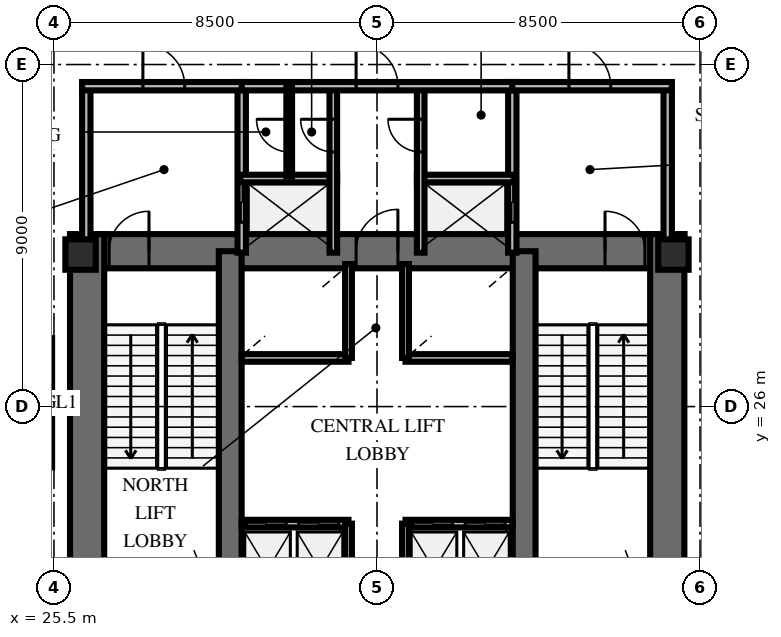
"""IFC4 building model, lengths in metres.
Left out: names, types, materials, properties, quantities, classifications, styles, units other than length and angle.
Written with IfcOpenShell. Run it as: python <this file> out.ifc"""

import sys

from ifc_helpers import new_model, si_unit, direction, frame, frame_2d, origin, origin_2d, place, context, subcontext, project, spatial, rectangle, extrude, element, fill, save


model = new_model("IFC4")
c1 = context("Model", 3, precision=1e-05, world=origin(), true_north=direction((0.0, 1.0)))
c2 = subcontext(c1, "Body", "Model", "MODEL_VIEW")
j1 = project(units=[si_unit("LENGTHUNIT", "METRE"), si_unit("PLANEANGLEUNIT", "RADIAN")], contexts=[c1])
p1 = place(None, origin())
s1 = spatial("IfcSite", under=j1, at=p1, CompositionType="ELEMENT")
p2 = place(p1, origin())
s2 = spatial("IfcBuilding", under=s1, at=p2, CompositionType="ELEMENT")
p3 = place(p2, frame((0.0, 0.0, 20.4)))
s3 = spatial("IfcBuildingStorey", under=s2, at=p3, CompositionType="ELEMENT", Elevation=20.4)
p4 = place(p3, frame((25.922, 30.088, 0.0), z_axis=(0.0, 0.0, 1.0), x_axis=(1.0, 0.0, 0.0)))
e1 = element("IfcWall", 1, at=p4, inside=s3, PredefinedType="SHEAR", context=c2, shape_type="SweptSolid", body=[
    extrude(rectangle(XDim=16.166, YDim=0.9, at=frame_2d((8.083, 0.0))), origin(), (0.0, 0.0, 1.0), 4.8),
])
p5 = place(p4, frame((1.028, 0.0, 0.0)))
e2 = element("IfcOpeningElement", 2, at=p5, cuts=e1, PredefinedType="OPENING", context=c2, shape_type="SweptSolid", body=[
    extrude(rectangle(XDim=1.05, YDim=2.15, at=frame_2d((0.525, 1.075))), frame((0.0, 0.46, 0.0), z_axis=(0.0, -1.0, 0.0), x_axis=(1.0, 0.0, 0.0)), (0.0, 0.0, 1.0), 0.92),
])
p6 = place(p4, frame((14.078, 0.0, 0.0)))
e3 = element("IfcOpeningElement", 3, at=p6, cuts=e1, PredefinedType="OPENING", context=c2, shape_type="SweptSolid", body=[
    extrude(rectangle(XDim=1.05, YDim=2.15, at=frame_2d((0.525, 1.075))), frame((0.0, 0.46, 0.0), z_axis=(0.0, -1.0, 0.0), x_axis=(1.0, 0.0, 0.0)), (0.0, 0.0, 1.0), 0.92),
])
p7 = place(p4, frame((7.528, 0.0, 0.0)))
e4 = element("IfcOpeningElement", 4, at=p7, cuts=e1, PredefinedType="OPENING", context=c2, shape_type="SweptSolid", body=[
    extrude(rectangle(XDim=1.1, YDim=2.15, at=frame_2d((0.55, 1.075))), frame((0.0, 0.46, 0.0), z_axis=(0.0, -1.0, 0.0), x_axis=(1.0, 0.0, 0.0)), (0.0, 0.0, 1.0), 0.92),
])
for number, where, z_axis, x_axis in (
    (5, (26.372, 19.662, 0.0), (0.0, 0.0, 1.0), (0.0, 1.0, 0.0)),
    (6, (41.638, 19.662, 0.0), (0.0, 0.0, 1.0), (0.0, 1.0, 0.0)),
):
    element("IfcWall", number, at=place(p3, frame(where, z_axis=z_axis, x_axis=x_axis)), inside=s3, PredefinedType="SHEAR", context=c2, shape_type="SweptSolid", body=[
        extrude(rectangle(XDim=10.876, YDim=0.9, at=frame_2d((5.438, 0.0))), origin(), (0.0, 0.0, 1.0), 4.8),
    ])
for number, where, z_axis, x_axis in (
    (7, (30.138, 20.112, 0.0), (0.0, 0.0, 1.0), (0.0, 1.0, 0.0)),
    (8, (37.872, 20.112, 0.0), (0.0, 0.0, 1.0), (0.0, 1.0, 0.0)),
):
    element("IfcWall", number, at=place(p3, frame(where, z_axis=z_axis, x_axis=x_axis)), inside=s3, PredefinedType="SHEAR", context=c2, shape_type="SweptSolid", body=[
        extrude(rectangle(XDim=9.976, YDim=0.6, at=frame_2d((4.988, 0.0))), origin(), (0.0, 0.0, 1.0), 4.8),
    ])
for number, where, z_axis, x_axis in (
    (9, (26.2, 30.0, 0.0), (0.0, 0.0, 1.0), (1.0, 0.0, 0.0)),
    (10, (41.8, 30.0, 0.0), (0.0, 0.0, 1.0), (1.0, 0.0, 0.0)),
):
    element("IfcColumn", number, at=place(p3, frame(where, z_axis=z_axis, x_axis=x_axis)), inside=s3, PredefinedType="PILASTER", context=c2, shape_type="SweptSolid", body=[
        extrude(rectangle(XDim=0.8, YDim=0.8, at=origin_2d()), origin(), (0.0, 0.0, 1.0), 4.8),
    ])
p8 = place(p3, frame((26.35, 30.05, 0.0), z_axis=(0.0, 0.0, 1.0), x_axis=(0.0, 1.0, 0.0)))
e11 = element("IfcWall", 11, at=p8, inside=s3, PredefinedType="SOLIDWALL", context=c2, shape_type="SweptSolid", body=[
    extrude(rectangle(XDim=4.38, YDim=0.22, at=frame_2d((2.19, 0.0))), origin(), (0.0, 0.0, 1.0), 3.56),
])
p9 = place(p3, frame((30.44, 30.05, 0.0), z_axis=(0.0, 0.0, 1.0), x_axis=(0.0, 1.0, 0.0)))
e12 = element("IfcWall", 12, at=p9, inside=s3, PredefinedType="SOLIDWALL", context=c2, shape_type="SweptSolid", body=[
    extrude(rectangle(XDim=4.38, YDim=0.22, at=frame_2d((2.19, 0.0))), origin(), (0.0, 0.0, 1.0), 3.56),
])
p10 = place(p9, frame((0.8, 0.0, 0.0)))
e13 = element("IfcOpeningElement", 13, at=p10, cuts=e12, PredefinedType="OPENING", context=c2, shape_type="SweptSolid", body=[
    extrude(rectangle(XDim=1.05, YDim=2.1, at=frame_2d((0.525, 1.05))), frame((0.0, 0.12, 0.0), z_axis=(0.0, -1.0, 0.0), x_axis=(1.0, 0.0, 0.0)), (0.0, 0.0, 1.0), 0.24),
])
p11 = place(p3, frame((26.24, 34.43, 0.0), z_axis=(0.0, 0.0, 1.0), x_axis=(1.0, 0.0, 0.0)))
e14 = element("IfcWall", 14, at=p11, inside=s3, PredefinedType="SOLIDWALL", context=c2, shape_type="SweptSolid", body=[
    extrude(rectangle(XDim=4.31, YDim=0.22, at=frame_2d((2.155, 0.0))), origin(), (0.0, 0.0, 1.0), 3.56),
])
p12 = place(p11, frame((1.6, 0.0, 0.0)))
e15 = element("IfcOpeningElement", 15, at=p12, cuts=e14, PredefinedType="OPENING", context=c2, shape_type="SweptSolid", body=[
    extrude(rectangle(XDim=1.1, YDim=2.15, at=frame_2d((0.55, 1.075))), frame((0.0, 0.12, 0.0), z_axis=(0.0, -1.0, 0.0), x_axis=(1.0, 0.0, 0.0)), (0.0, 0.0, 1.0), 0.24),
])
p13 = place(p3, frame((30.4, 32.0, 0.0), z_axis=(0.0, 0.0, 1.0), x_axis=(1.0, 0.0, 0.0)))
e16 = element("IfcWall", 16, at=p13, inside=s3, PredefinedType="SOLIDWALL", context=c2, shape_type="SweptSolid", body=[
    extrude(rectangle(XDim=2.55, YDim=0.2, at=frame_2d((1.275, 0.0))), origin(), (0.0, 0.0, 1.0), 3.56),
])
p14 = place(p3, frame((32.85, 30.05, 0.0), z_axis=(0.0, 0.0, 1.0), x_axis=(0.0, 1.0, 0.0)))
e17 = element("IfcWall", 17, at=p14, inside=s3, PredefinedType="SOLIDWALL", context=c2, shape_type="SweptSolid", body=[
    extrude(rectangle(XDim=4.38, YDim=0.2, at=frame_2d((2.19, 0.0))), origin(), (0.0, 0.0, 1.0), 3.56),
])
p15 = place(p14, frame((2.65, 0.0, 0.0)))
e18 = element("IfcOpeningElement", 18, at=p15, cuts=e17, PredefinedType="OPENING", context=c2, shape_type="SweptSolid", body=[
    extrude(rectangle(XDim=0.86, YDim=2.05, at=frame_2d((0.43, 1.025))), frame((0.0, 0.11, 0.0), z_axis=(0.0, -1.0, 0.0), x_axis=(1.0, 0.0, 0.0)), (0.0, 0.0, 1.0), 0.22),
])
p16 = place(p3, frame((37.56, 30.05, 0.0), z_axis=(0.0, 0.0, 1.0), x_axis=(0.0, 1.0, 0.0)))
e19 = element("IfcWall", 19, at=p16, inside=s3, PredefinedType="SOLIDWALL", context=c2, shape_type="SweptSolid", body=[
    extrude(rectangle(XDim=4.38, YDim=0.22, at=frame_2d((2.19, 0.0))), origin(), (0.0, 0.0, 1.0), 3.56),
])
p17 = place(p16, frame((0.8, 0.0, 0.0)))
e20 = element("IfcOpeningElement", 20, at=p17, cuts=e19, PredefinedType="OPENING", context=c2, shape_type="SweptSolid", body=[
    extrude(rectangle(XDim=1.05, YDim=2.1, at=frame_2d((0.525, 1.05))), frame((0.0, 0.12, 0.0), z_axis=(0.0, -1.0, 0.0), x_axis=(1.0, 0.0, 0.0)), (0.0, 0.0, 1.0), 0.24),
])
p18 = place(p3, frame((41.65, 30.05, 0.0), z_axis=(0.0, 0.0, 1.0), x_axis=(0.0, 1.0, 0.0)))
e21 = element("IfcWall", 21, at=p18, inside=s3, PredefinedType="SOLIDWALL", context=c2, shape_type="SweptSolid", body=[
    extrude(rectangle(XDim=4.38, YDim=0.22, at=frame_2d((2.19, 0.0))), origin(), (0.0, 0.0, 1.0), 3.56),
])
p19 = place(p3, frame((37.45, 34.43, 0.0), z_axis=(0.0, 0.0, 1.0), x_axis=(1.0, 0.0, 0.0)))
e22 = element("IfcWall", 22, at=p19, inside=s3, PredefinedType="SOLIDWALL", context=c2, shape_type="SweptSolid", body=[
    extrude(rectangle(XDim=4.31, YDim=0.22, at=frame_2d((2.155, 0.0))), origin(), (0.0, 0.0, 1.0), 3.56),
])
p20 = place(p19, frame((1.6, 0.0, 0.0)))
e23 = element("IfcOpeningElement", 23, at=p20, cuts=e22, PredefinedType="OPENING", context=c2, shape_type="SweptSolid", body=[
    extrude(rectangle(XDim=1.1, YDim=2.15, at=frame_2d((0.55, 1.075))), frame((0.0, 0.12, 0.0), z_axis=(0.0, -1.0, 0.0), x_axis=(1.0, 0.0, 0.0)), (0.0, 0.0, 1.0), 0.24),
])
p21 = place(p3, frame((35.05, 32.0, 0.0), z_axis=(0.0, 0.0, 1.0), x_axis=(1.0, 0.0, 0.0)))
e24 = element("IfcWall", 24, at=p21, inside=s3, PredefinedType="SOLIDWALL", context=c2, shape_type="SweptSolid", body=[
    extrude(rectangle(XDim=2.55, YDim=0.2, at=frame_2d((1.275, 0.0))), origin(), (0.0, 0.0, 1.0), 3.56),
])
p22 = place(p3, frame((35.15, 30.05, 0.0), z_axis=(0.0, 0.0, 1.0), x_axis=(0.0, 1.0, 0.0)))
e25 = element("IfcWall", 25, at=p22, inside=s3, PredefinedType="SOLIDWALL", context=c2, shape_type="SweptSolid", body=[
    extrude(rectangle(XDim=4.38, YDim=0.2, at=frame_2d((2.19, 0.0))), origin(), (0.0, 0.0, 1.0), 3.56),
])
p23 = place(p22, frame((2.65, 0.0, 0.0)))
e26 = element("IfcOpeningElement", 26, at=p23, cuts=e25, PredefinedType="OPENING", context=c2, shape_type="SweptSolid", body=[
    extrude(rectangle(XDim=0.86, YDim=2.05, at=frame_2d((0.43, 1.025))), frame((0.0, 0.11, 0.0), z_axis=(0.0, -1.0, 0.0), x_axis=(1.0, 0.0, 0.0)), (0.0, 0.0, 1.0), 0.22),
])
p24 = place(p3, frame((30.44, 34.43, 0.0), z_axis=(0.0, 0.0, 1.0), x_axis=(1.0, 0.0, 0.0)))
e27 = element("IfcWall", 27, at=p24, inside=s3, PredefinedType="SOLIDWALL", context=c2, shape_type="SweptSolid", body=[
    extrude(rectangle(XDim=7.12, YDim=0.22, at=frame_2d((3.56, 0.0))), origin(), (0.0, 0.0, 1.0), 3.56),
])
p25 = place(p24, frame((3.01, 0.0, 0.0)))
e28 = element("IfcOpeningElement", 28, at=p25, cuts=e27, PredefinedType="OPENING", context=c2, shape_type="SweptSolid", body=[
    extrude(rectangle(XDim=1.1, YDim=2.15, at=frame_2d((0.55, 1.075))), frame((0.0, 0.12, 0.0), z_axis=(0.0, -1.0, 0.0), x_axis=(1.0, 0.0, 0.0)), (0.0, 0.0, 1.0), 0.24),
])
p26 = place(p3, frame((31.69, 32.05, 0.0), z_axis=(0.0, 0.0, 1.0), x_axis=(0.0, 1.0, 0.0)))
e29 = element("IfcWall", 29, at=p26, inside=s3, PredefinedType="PARTITIONING", context=c2, shape_type="SweptSolid", body=[
    extrude(rectangle(XDim=2.33, YDim=0.15, at=frame_2d((1.165, 0.0))), origin(), (0.0, 0.0, 1.0), 3.56),
])
p27 = place(p26, frame((0.65, 0.0, 0.0)))
e30 = element("IfcOpeningElement", 30, at=p27, cuts=e29, PredefinedType="OPENING", context=c2, shape_type="SweptSolid", body=[
    extrude(rectangle(XDim=0.86, YDim=2.05, at=frame_2d((0.43, 1.025))), frame((0.0, 0.085, 0.0), z_axis=(0.0, -1.0, 0.0), x_axis=(1.0, 0.0, 0.0)), (0.0, 0.0, 1.0), 0.17),
])
p28 = place(p3, frame((30.44, 22.92, 0.0), z_axis=(0.0, 0.0, 1.0), x_axis=(1.0, 0.0, 0.0)))
e31 = element("IfcWall", 31, at=p28, inside=s3, PredefinedType="SOLIDWALL", context=c2, shape_type="SweptSolid", body=[
    extrude(rectangle(XDim=2.81, YDim=0.2, at=frame_2d((1.405, 0.0))), origin(), (0.0, 0.0, 1.0), 3.56),
])
p29 = place(p28, frame((0.12, 0.0, 0.0)))
e32 = element("IfcOpeningElement", 32, at=p29, cuts=e31, PredefinedType="OPENING", context=c2, shape_type="SweptSolid", body=[
    extrude(rectangle(XDim=1.05, YDim=2.1, at=frame_2d((0.525, 1.05))), frame((0.0, 0.11, 0.0), z_axis=(0.0, -1.0, 0.0), x_axis=(1.0, 0.0, 0.0)), (0.0, 0.0, 1.0), 0.22),
])
p30 = place(p28, frame((1.5, 0.0, 0.0)))
e33 = element("IfcOpeningElement", 33, at=p30, cuts=e31, PredefinedType="OPENING", context=c2, shape_type="SweptSolid", body=[
    extrude(rectangle(XDim=1.05, YDim=2.1, at=frame_2d((0.525, 1.05))), frame((0.0, 0.11, 0.0), z_axis=(0.0, -1.0, 0.0), x_axis=(1.0, 0.0, 0.0)), (0.0, 0.0, 1.0), 0.22),
])
p31 = place(p3, frame((33.25, 20.5, 0.0), z_axis=(0.0, 0.0, 1.0), x_axis=(0.0, 1.0, 0.0)))
e34 = element("IfcWall", 34, at=p31, inside=s3, PredefinedType="SOLIDWALL", context=c2, shape_type="SweptSolid", body=[
    extrude(rectangle(XDim=2.42, YDim=0.18, at=frame_2d((1.21, 0.0))), origin(), (0.0, 0.0, 1.0), 3.56),
])
p32 = place(p3, frame((34.75, 22.92, 0.0), z_axis=(0.0, 0.0, 1.0), x_axis=(1.0, 0.0, 0.0)))
e35 = element("IfcWall", 35, at=p32, inside=s3, PredefinedType="SOLIDWALL", context=c2, shape_type="SweptSolid", body=[
    extrude(rectangle(XDim=2.81, YDim=0.2, at=frame_2d((1.405, 0.0))), origin(), (0.0, 0.0, 1.0), 3.56),
])
p33 = place(p32, frame((0.19, 0.0, 0.0)))
e36 = element("IfcOpeningElement", 36, at=p33, cuts=e35, PredefinedType="OPENING", context=c2, shape_type="SweptSolid", body=[
    extrude(rectangle(XDim=1.05, YDim=2.1, at=frame_2d((0.525, 1.05))), frame((0.0, 0.11, 0.0), z_axis=(0.0, -1.0, 0.0), x_axis=(1.0, 0.0, 0.0)), (0.0, 0.0, 1.0), 0.22),
])
p34 = place(p32, frame((1.57, 0.0, 0.0)))
e37 = element("IfcOpeningElement", 37, at=p34, cuts=e35, PredefinedType="OPENING", context=c2, shape_type="SweptSolid", body=[
    extrude(rectangle(XDim=1.05, YDim=2.1, at=frame_2d((0.525, 1.05))), frame((0.0, 0.11, 0.0), z_axis=(0.0, -1.0, 0.0), x_axis=(1.0, 0.0, 0.0)), (0.0, 0.0, 1.0), 0.22),
])
p35 = place(p3, frame((34.75, 20.5, 0.0), z_axis=(0.0, 0.0, 1.0), x_axis=(0.0, 1.0, 0.0)))
e38 = element("IfcWall", 38, at=p35, inside=s3, PredefinedType="SOLIDWALL", context=c2, shape_type="SweptSolid", body=[
    extrude(rectangle(XDim=2.42, YDim=0.18, at=frame_2d((1.21, 0.0))), origin(), (0.0, 0.0, 1.0), 3.56),
])
p36 = place(p3, frame((30.44, 27.28, 0.0), z_axis=(0.0, 0.0, 1.0), x_axis=(1.0, 0.0, 0.0)))
e39 = element("IfcWall", 39, at=p36, inside=s3, PredefinedType="SOLIDWALL", context=c2, shape_type="SweptSolid", body=[
    extrude(rectangle(XDim=2.81, YDim=0.2, at=frame_2d((1.405, 0.0))), origin(), (0.0, 0.0, 1.0), 3.56),
])
p37 = place(p3, frame((33.25, 27.28, 0.0), z_axis=(0.0, 0.0, 1.0), x_axis=(0.0, 1.0, 0.0)))
e40 = element("IfcWall", 40, at=p37, inside=s3, PredefinedType="SOLIDWALL", context=c2, shape_type="SweptSolid", body=[
    extrude(rectangle(XDim=2.47, YDim=0.18, at=frame_2d((1.235, 0.0))), origin(), (0.0, 0.0, 1.0), 3.56),
])
p38 = place(p3, frame((34.75, 27.28, 0.0), z_axis=(0.0, 0.0, 1.0), x_axis=(1.0, 0.0, 0.0)))
e41 = element("IfcWall", 41, at=p38, inside=s3, PredefinedType="SOLIDWALL", context=c2, shape_type="SweptSolid", body=[
    extrude(rectangle(XDim=2.81, YDim=0.2, at=frame_2d((1.405, 0.0))), origin(), (0.0, 0.0, 1.0), 3.56),
])
p39 = place(p3, frame((34.75, 27.28, 0.0), z_axis=(0.0, 0.0, 1.0), x_axis=(0.0, 1.0, 0.0)))
e42 = element("IfcWall", 42, at=p39, inside=s3, PredefinedType="SOLIDWALL", context=c2, shape_type="SweptSolid", body=[
    extrude(rectangle(XDim=2.47, YDim=0.18, at=frame_2d((1.235, 0.0))), origin(), (0.0, 0.0, 1.0), 3.56),
])
p40 = place(p5, origin())
e43 = element("IfcDoor", 43, at=p40, inside=s3, OperationType="SINGLE_SWING_RIGHT", PredefinedType="DOOR", context=c2, shape_type="SweptSolid", body=[
    extrude(rectangle(XDim=1.05, YDim=2.15, at=frame_2d((0.525, 1.075))), frame((0.0, 0.025, 0.0), z_axis=(0.0, -1.0, 0.0), x_axis=(1.0, 0.0, 0.0)), (0.0, 0.0, 1.0), 0.05),
])
fill(e2, e43)
p41 = place(p6, origin())
e44 = element("IfcDoor", 44, at=p41, inside=s3, OperationType="SINGLE_SWING_LEFT", PredefinedType="DOOR", context=c2, shape_type="SweptSolid", body=[
    extrude(rectangle(XDim=1.05, YDim=2.15, at=frame_2d((0.525, 1.075))), frame((0.0, 0.025, 0.0), z_axis=(0.0, -1.0, 0.0), x_axis=(1.0, 0.0, 0.0)), (0.0, 0.0, 1.0), 0.05),
])
fill(e3, e44)
p42 = place(p7, origin())
e45 = element("IfcDoor", 45, at=p42, inside=s3, OperationType="SINGLE_SWING_RIGHT", PredefinedType="DOOR", context=c2, shape_type="SweptSolid", body=[
    extrude(rectangle(XDim=1.1, YDim=2.15, at=frame_2d((0.55, 1.075))), frame((0.0, 0.025, 0.0), z_axis=(0.0, -1.0, 0.0), x_axis=(1.0, 0.0, 0.0)), (0.0, 0.0, 1.0), 0.05),
])
fill(e4, e45)
p43 = place(p12, origin())
e46 = element("IfcDoor", 46, at=p43, inside=s3, OperationType="SINGLE_SWING_LEFT", PredefinedType="DOOR", context=c2, shape_type="SweptSolid", body=[
    extrude(rectangle(XDim=1.1, YDim=2.15, at=frame_2d((0.55, 1.075))), frame((0.0, 0.025, 0.0), z_axis=(0.0, -1.0, 0.0), x_axis=(1.0, 0.0, 0.0)), (0.0, 0.0, 1.0), 0.05),
])
fill(e15, e46)
p44 = place(p10, origin())
e47 = element("IfcDoor", 47, at=p44, inside=s3, OperationType="DOUBLE_DOOR_SLIDING", PredefinedType="USERDEFINED", context=c2, shape_type="SweptSolid", body=[
    extrude(rectangle(XDim=1.05, YDim=2.1, at=frame_2d((0.525, 1.05))), frame((0.0, 0.025, 0.0), z_axis=(0.0, -1.0, 0.0), x_axis=(1.0, 0.0, 0.0)), (0.0, 0.0, 1.0), 0.05),
])
fill(e13, e47)
p45 = place(p15, origin())
e48 = element("IfcDoor", 48, at=p45, inside=s3, OperationType="SINGLE_SWING_RIGHT", PredefinedType="TRAPDOOR", context=c2, shape_type="SweptSolid", body=[
    extrude(rectangle(XDim=0.86, YDim=2.05, at=frame_2d((0.43, 1.025))), frame((0.0, 0.025, 0.0), z_axis=(0.0, -1.0, 0.0), x_axis=(1.0, 0.0, 0.0)), (0.0, 0.0, 1.0), 0.05),
])
fill(e18, e48)
p46 = place(p20, origin())
e49 = element("IfcDoor", 49, at=p46, inside=s3, OperationType="SINGLE_SWING_LEFT", PredefinedType="DOOR", context=c2, shape_type="SweptSolid", body=[
    extrude(rectangle(XDim=1.1, YDim=2.15, at=frame_2d((0.55, 1.075))), frame((0.0, 0.025, 0.0), z_axis=(0.0, -1.0, 0.0), x_axis=(1.0, 0.0, 0.0)), (0.0, 0.0, 1.0), 0.05),
])
fill(e23, e49)
p47 = place(p17, origin())
e50 = element("IfcDoor", 50, at=p47, inside=s3, OperationType="DOUBLE_DOOR_SLIDING", PredefinedType="USERDEFINED", context=c2, shape_type="SweptSolid", body=[
    extrude(rectangle(XDim=1.05, YDim=2.1, at=frame_2d((0.525, 1.05))), frame((0.0, 0.025, 0.0), z_axis=(0.0, -1.0, 0.0), x_axis=(1.0, 0.0, 0.0)), (0.0, 0.0, 1.0), 0.05),
])
fill(e20, e50)
p48 = place(p23, origin())
e51 = element("IfcDoor", 51, at=p48, inside=s3, OperationType="SINGLE_SWING_RIGHT", PredefinedType="TRAPDOOR", context=c2, shape_type="SweptSolid", body=[
    extrude(rectangle(XDim=0.86, YDim=2.05, at=frame_2d((0.43, 1.025))), frame((0.0, 0.025, 0.0), z_axis=(0.0, -1.0, 0.0), x_axis=(1.0, 0.0, 0.0)), (0.0, 0.0, 1.0), 0.05),
])
fill(e26, e51)
p49 = place(p25, origin())
e52 = element("IfcDoor", 52, at=p49, inside=s3, OperationType="SINGLE_SWING_LEFT", PredefinedType="DOOR", context=c2, shape_type="SweptSolid", body=[
    extrude(rectangle(XDim=1.1, YDim=2.15, at=frame_2d((0.55, 1.075))), frame((0.0, 0.025, 0.0), z_axis=(0.0, -1.0, 0.0), x_axis=(1.0, 0.0, 0.0)), (0.0, 0.0, 1.0), 0.05),
])
fill(e28, e52)
p50 = place(p27, origin())
e53 = element("IfcDoor", 53, at=p50, inside=s3, OperationType="SINGLE_SWING_RIGHT", PredefinedType="TRAPDOOR", context=c2, shape_type="SweptSolid", body=[
    extrude(rectangle(XDim=0.86, YDim=2.05, at=frame_2d((0.43, 1.025))), frame((0.0, 0.025, 0.0), z_axis=(0.0, -1.0, 0.0), x_axis=(1.0, 0.0, 0.0)), (0.0, 0.0, 1.0), 0.05),
])
fill(e30, e53)
p51 = place(p29, origin())
e54 = element("IfcDoor", 54, at=p51, inside=s3, OperationType="DOUBLE_DOOR_SLIDING", PredefinedType="USERDEFINED", context=c2, shape_type="SweptSolid", body=[
    extrude(rectangle(XDim=1.05, YDim=2.1, at=frame_2d((0.525, 1.05))), frame((0.0, 0.025, 0.0), z_axis=(0.0, -1.0, 0.0), x_axis=(1.0, 0.0, 0.0)), (0.0, 0.0, 1.0), 0.05),
])
fill(e32, e54)
p52 = place(p30, origin())
e55 = element("IfcDoor", 55, at=p52, inside=s3, OperationType="DOUBLE_DOOR_SLIDING", PredefinedType="USERDEFINED", context=c2, shape_type="SweptSolid", body=[
    extrude(rectangle(XDim=1.05, YDim=2.1, at=frame_2d((0.525, 1.05))), frame((0.0, 0.025, 0.0), z_axis=(0.0, -1.0, 0.0), x_axis=(1.0, 0.0, 0.0)), (0.0, 0.0, 1.0), 0.05),
])
fill(e33, e55)
p53 = place(p33, origin())
e56 = element("IfcDoor", 56, at=p53, inside=s3, OperationType="DOUBLE_DOOR_SLIDING", PredefinedType="USERDEFINED", context=c2, shape_type="SweptSolid", body=[
    extrude(rectangle(XDim=1.05, YDim=2.1, at=frame_2d((0.525, 1.05))), frame((0.0, 0.025, 0.0), z_axis=(0.0, -1.0, 0.0), x_axis=(1.0, 0.0, 0.0)), (0.0, 0.0, 1.0), 0.05),
])
fill(e36, e56)
p54 = place(p34, origin())
e57 = element("IfcDoor", 57, at=p54, inside=s3, OperationType="DOUBLE_DOOR_SLIDING", PredefinedType="USERDEFINED", context=c2, shape_type="SweptSolid", body=[
    extrude(rectangle(XDim=1.05, YDim=2.1, at=frame_2d((0.525, 1.05))), frame((0.0, 0.025, 0.0), z_axis=(0.0, -1.0, 0.0), x_axis=(1.0, 0.0, 0.0)), (0.0, 0.0, 1.0), 0.05),
])
fill(e37, e57)
save(model, sys.argv[1])
